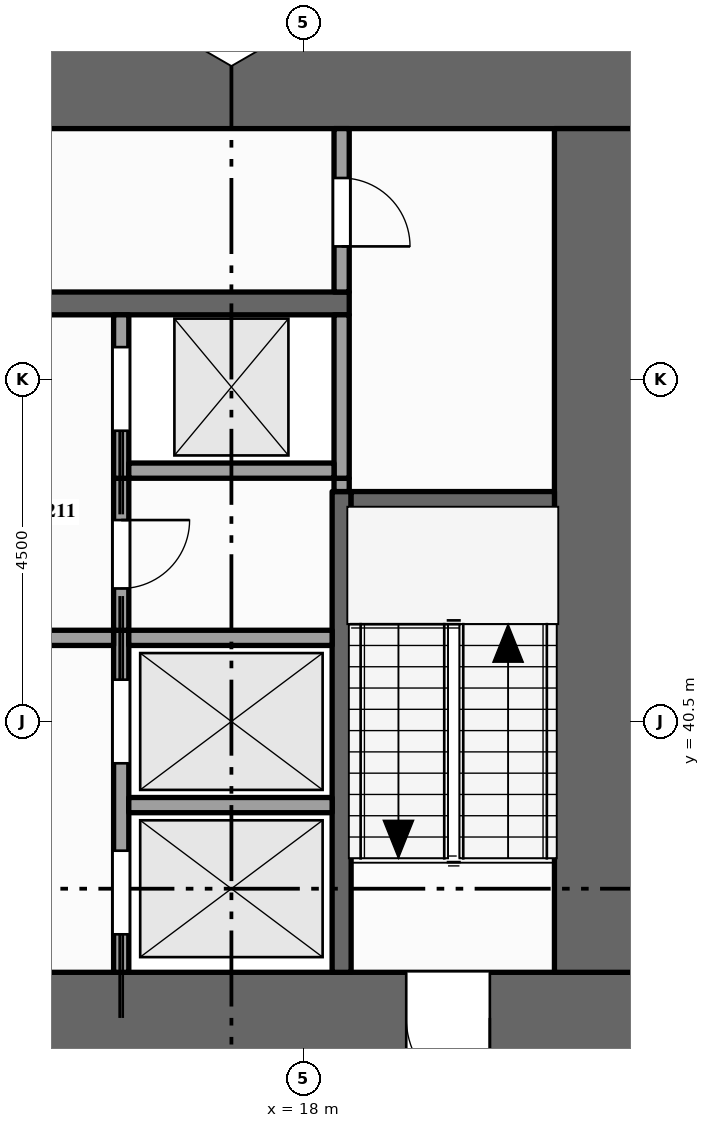
"""IFC4 building model, lengths in metres.
Left out: names, types, materials, properties, quantities, classifications, styles, units other than length and angle.
Written with IfcOpenShell. Run it as: python <this file> out.ifc"""

import sys

from ifc_helpers import new_model, si_unit, direction, frame, frame_2d, origin, place, context, subcontext, project, spatial, rectangle, extrude, element, fill, save


model = new_model("IFC4")
c1 = context("Model", 3, precision=1e-05, world=origin(), true_north=direction((0.0, 1.0)))
c2 = subcontext(c1, "Body", "Model", "MODEL_VIEW")
j1 = project(units=[si_unit("LENGTHUNIT", "METRE"), si_unit("PLANEANGLEUNIT", "RADIAN")], contexts=[c1])
p1 = place(None, origin())
s1 = spatial("IfcSite", under=j1, at=p1, CompositionType="ELEMENT")
p2 = place(p1, origin())
s2 = spatial("IfcBuilding", under=s1, at=p2, CompositionType="ELEMENT")
p3 = place(p2, frame((0.0, 0.0, 57.0)))
s3 = spatial("IfcBuildingStorey", under=s2, at=p3, CompositionType="ELEMENT", Elevation=57.0)
p4 = place(p3, frame((0.0, 36.6, -0.15), z_axis=(0.0, 0.0, 1.0), x_axis=(1.0, 0.0, 0.0)))
e1 = element("IfcWall", 1, at=p4, inside=s3, PredefinedType="SHEAR", context=c2, shape_type="SweptSolid", body=[
    extrude(rectangle(XDim=22.5, YDim=1.2, at=frame_2d((11.25, 0.0))), origin(), (0.0, 0.0, 1.0), 4.0),
])
p5 = place(p4, frame((7.1, 0.0, 0.15)))
e2 = element("IfcOpeningElement", 2, at=p5, cuts=e1, PredefinedType="OPENING", context=c2, shape_type="SweptSolid", body=[
    extrude(rectangle(XDim=1.8, YDim=2.1, at=frame_2d((0.9, 1.05))), frame((0.0, 0.61, 0.0), z_axis=(0.0, -1.0, 0.0), x_axis=(1.0, 0.0, 0.0)), (0.0, 0.0, 1.0), 1.22),
])
p6 = place(p4, frame((13.15, 0.0, 0.15)))
e3 = element("IfcOpeningElement", 3, at=p6, cuts=e1, PredefinedType="OPENING", context=c2, shape_type="SweptSolid", body=[
    extrude(rectangle(XDim=1.1, YDim=2.1, at=frame_2d((0.55, 1.05))), frame((0.0, 0.61, 0.0), z_axis=(0.0, -1.0, 0.0), x_axis=(1.0, 0.0, 0.0)), (0.0, 0.0, 1.0), 1.22),
])
p7 = place(p4, frame((2.15, 0.0, 0.15)))
e4 = element("IfcOpeningElement", 4, at=p7, cuts=e1, PredefinedType="OPENING", context=c2, shape_type="SweptSolid", body=[
    extrude(rectangle(XDim=1.1, YDim=2.1, at=frame_2d((0.55, 1.05))), frame((0.0, 0.61, 0.0), z_axis=(0.0, -1.0, 0.0), x_axis=(1.0, 0.0, 0.0)), (0.0, 0.0, 1.0), 1.22),
])
p8 = place(p4, frame((19.35, 0.0, 0.15)))
e5 = element("IfcOpeningElement", 5, at=p8, cuts=e1, PredefinedType="OPENING", context=c2, shape_type="SweptSolid", body=[
    extrude(rectangle(XDim=1.1, YDim=2.1, at=frame_2d((0.55, 1.05))), frame((0.0, 0.61, 0.0), z_axis=(0.0, -1.0, 0.0), x_axis=(1.0, 0.0, 0.0)), (0.0, 0.0, 1.0), 1.22),
])
p9 = place(p3, frame((0.0, 48.9, -0.15), z_axis=(0.0, 0.0, 1.0), x_axis=(1.0, 0.0, 0.0)))
e6 = element("IfcWall", 6, at=p9, inside=s3, PredefinedType="SHEAR", context=c2, shape_type="SweptSolid", body=[
    extrude(rectangle(XDim=22.5, YDim=1.2, at=frame_2d((11.25, 0.0))), origin(), (0.0, 0.0, 1.0), 4.0),
])
p10 = place(p3, frame((21.9, 37.2, -0.15), z_axis=(0.0, 0.0, 1.0), x_axis=(0.0, 1.0, 0.0)))
e7 = element("IfcWall", 7, at=p10, inside=s3, PredefinedType="SHEAR", context=c2, shape_type="SweptSolid", body=[
    extrude(rectangle(XDim=11.1, YDim=1.2, at=frame_2d((5.55, 0.0))), origin(), (0.0, 0.0, 1.0), 4.0),
])
p11 = place(p3, frame((15.6, 37.2, 0.0), z_axis=(0.0, 0.0, 1.0), x_axis=(0.0, 1.0, 0.0)))
e8 = element("IfcWall", 8, at=p11, inside=s3, PredefinedType="SOLIDWALL", context=c2, shape_type="SweptSolid", body=[
    extrude(rectangle(XDim=4.5, YDim=0.2, at=frame_2d((2.25, 0.0))), origin(), (0.0, 0.0, 1.0), 3.85),
])
p12 = place(p11, frame((0.5, 0.0, 0.012)))
e9 = element("IfcOpeningElement", 9, at=p12, cuts=e8, PredefinedType="OPENING", context=c2, shape_type="SweptSolid", body=[
    extrude(rectangle(XDim=1.1, YDim=2.1, at=frame_2d((0.55, 1.05))), frame((0.0, 0.11, 0.0), z_axis=(0.0, -1.0, 0.0), x_axis=(1.0, 0.0, 0.0)), (0.0, 0.0, 1.0), 0.22),
])
p13 = place(p11, frame((2.75, 0.0, 0.012)))
e10 = element("IfcOpeningElement", 10, at=p13, cuts=e8, PredefinedType="OPENING", context=c2, shape_type="SweptSolid", body=[
    extrude(rectangle(XDim=1.1, YDim=2.1, at=frame_2d((0.55, 1.05))), frame((0.0, 0.11, 0.0), z_axis=(0.0, -1.0, 0.0), x_axis=(1.0, 0.0, 0.0)), (0.0, 0.0, 1.0), 0.22),
])
p14 = place(p3, frame((15.6, 41.7, 0.0), z_axis=(0.0, 0.0, 1.0), x_axis=(0.0, 1.0, 0.0)))
e11 = element("IfcWall", 11, at=p14, inside=s3, PredefinedType="PARTITIONING", context=c2, shape_type="SweptSolid", body=[
    extrude(rectangle(XDim=2.0, YDim=0.2, at=frame_2d((1.0, 0.0))), origin(), (0.0, 0.0, 1.0), 3.85),
])
p15 = place(p14, frame((0.55, 0.0, 0.0)))
e12 = element("IfcOpeningElement", 12, at=p15, cuts=e11, PredefinedType="OPENING", context=c2, shape_type="SweptSolid", body=[
    extrude(rectangle(XDim=0.9, YDim=2.1, at=frame_2d((0.45, 1.05))), frame((0.0, 0.11, 0.0), z_axis=(0.0, -1.0, 0.0), x_axis=(1.0, 0.0, 0.0)), (0.0, 0.0, 1.0), 0.22),
])
p16 = place(p3, frame((15.6, 43.7, 0.0), z_axis=(0.0, 0.0, 1.0), x_axis=(0.0, 1.0, 0.0)))
e13 = element("IfcWall", 13, at=p16, inside=s3, PredefinedType="SOLIDWALL", context=c2, shape_type="SweptSolid", body=[
    extrude(rectangle(XDim=2.15, YDim=0.2, at=frame_2d((1.075, 0.0))), origin(), (0.0, 0.0, 1.0), 3.85),
])
p17 = place(p16, frame((0.625, 0.0, 0.012)))
e14 = element("IfcOpeningElement", 14, at=p17, cuts=e13, PredefinedType="OPENING", context=c2, shape_type="SweptSolid", body=[
    extrude(rectangle(XDim=1.1, YDim=2.1, at=frame_2d((0.55, 1.05))), frame((0.0, 0.11, 0.0), z_axis=(0.0, -1.0, 0.0), x_axis=(1.0, 0.0, 0.0)), (0.0, 0.0, 1.0), 0.22),
])
p18 = place(p3, frame((18.5, 37.2, 0.0), z_axis=(0.0, 0.0, 1.0), x_axis=(0.0, 1.0, 0.0)))
e15 = element("IfcWall", 15, at=p18, inside=s3, PredefinedType="SHEAR", context=c2, shape_type="SweptSolid", body=[
    extrude(rectangle(XDim=6.325, YDim=0.25, at=frame_2d((3.163, 0.0))), origin(), (0.0, 0.0, 1.0), 3.85),
])
p19 = place(p3, frame((18.5, 43.525, 0.0), z_axis=(0.0, 0.0, 1.0), x_axis=(0.0, 1.0, 0.0)))
e16 = element("IfcWall", 16, at=p19, inside=s3, PredefinedType="PARTITIONING", context=c2, shape_type="SweptSolid", body=[
    extrude(rectangle(XDim=0.175, YDim=0.2, at=frame_2d((0.087, 0.0))), origin(), (0.0, 0.0, 1.0), 3.85),
])
p20 = place(p3, frame((18.5, 43.7, 0.0), z_axis=(0.0, 0.0, 1.0), x_axis=(0.0, 1.0, 0.0)))
e17 = element("IfcWall", 17, at=p20, inside=s3, PredefinedType="SOLIDWALL", context=c2, shape_type="SweptSolid", body=[
    extrude(rectangle(XDim=2.15, YDim=0.2, at=frame_2d((1.075, 0.0))), origin(), (0.0, 0.0, 1.0), 3.85),
])
p21 = place(p3, frame((18.5, 46.15, 0.0), z_axis=(0.0, 0.0, 1.0), x_axis=(0.0, 1.0, 0.0)))
e18 = element("IfcWall", 18, at=p21, inside=s3, PredefinedType="PARTITIONING", context=c2, shape_type="SweptSolid", body=[
    extrude(rectangle(XDim=2.15, YDim=0.2, at=frame_2d((1.075, 0.0))), origin(), (0.0, 0.0, 1.0), 3.85),
])
p22 = place(p21, frame((0.6, 0.0, 0.0)))
e19 = element("IfcOpeningElement", 19, at=p22, cuts=e18, PredefinedType="OPENING", context=c2, shape_type="SweptSolid", body=[
    extrude(rectangle(XDim=0.9, YDim=2.1, at=frame_2d((0.45, 1.05))), frame((0.0, 0.11, 0.0), z_axis=(0.0, -1.0, 0.0), x_axis=(1.0, 0.0, 0.0)), (0.0, 0.0, 1.0), 0.22),
])
p23 = place(p3, frame((15.7, 39.4, 0.0), z_axis=(0.0, 0.0, 1.0), x_axis=(1.0, 0.0, 0.0)))
e20 = element("IfcWall", 20, at=p23, inside=s3, PredefinedType="SOLIDWALL", context=c2, shape_type="SweptSolid", body=[
    extrude(rectangle(XDim=2.675, YDim=0.2, at=frame_2d((1.337, 0.0))), origin(), (0.0, 0.0, 1.0), 3.85),
])
p24 = place(p3, frame((11.9, 41.6, 0.0), z_axis=(0.0, 0.0, 1.0), x_axis=(1.0, 0.0, 0.0)))
e21 = element("IfcWall", 21, at=p24, inside=s3, PredefinedType="PARTITIONING", context=c2, shape_type="SweptSolid", body=[
    extrude(rectangle(XDim=3.6, YDim=0.2, at=frame_2d((1.8, 0.0))), origin(), (0.0, 0.0, 1.0), 3.85),
])
p25 = place(p24, frame((1.3, 0.0, 0.0)))
e22 = element("IfcOpeningElement", 22, at=p25, cuts=e21, PredefinedType="OPENING", context=c2, shape_type="SweptSolid", body=[
    extrude(rectangle(XDim=1.0, YDim=2.1, at=frame_2d((0.5, 1.05))), frame((0.0, 0.11, 0.0), z_axis=(0.0, -1.0, 0.0), x_axis=(1.0, 0.0, 0.0)), (0.0, 0.0, 1.0), 0.22),
])
p26 = place(p3, frame((15.7, 41.6, 0.0), z_axis=(0.0, 0.0, 1.0), x_axis=(1.0, 0.0, 0.0)))
e23 = element("IfcWall", 23, at=p26, inside=s3, PredefinedType="SOLIDWALL", context=c2, shape_type="SweptSolid", body=[
    extrude(rectangle(XDim=2.675, YDim=0.2, at=frame_2d((1.337, 0.0))), origin(), (0.0, 0.0, 1.0), 3.85),
])
p27 = place(p3, frame((18.625, 43.4, 0.0), z_axis=(0.0, 0.0, 1.0), x_axis=(1.0, 0.0, 0.0)))
e24 = element("IfcWall", 24, at=p27, inside=s3, PredefinedType="SHEAR", context=c2, shape_type="SweptSolid", body=[
    extrude(rectangle(XDim=2.675, YDim=0.25, at=frame_2d((1.337, 0.0))), origin(), (0.0, 0.0, 1.0), 3.85),
])
p28 = place(p3, frame((15.7, 43.8, 0.0), z_axis=(0.0, 0.0, 1.0), x_axis=(1.0, 0.0, 0.0)))
e25 = element("IfcWall", 25, at=p28, inside=s3, PredefinedType="SOLIDWALL", context=c2, shape_type="SweptSolid", body=[
    extrude(rectangle(XDim=2.7, YDim=0.2, at=frame_2d((1.35, 0.0))), origin(), (0.0, 0.0, 1.0), 3.85),
])
p29 = place(p3, frame((4.1, 46.0, 0.0), z_axis=(0.0, 0.0, 1.0), x_axis=(1.0, 0.0, 0.0)))
e26 = element("IfcWall", 26, at=p29, inside=s3, PredefinedType="SHEAR", context=c2, shape_type="SweptSolid", body=[
    extrude(rectangle(XDim=14.5, YDim=0.3, at=frame_2d((7.25, 0.0))), origin(), (0.0, 0.0, 1.0), 3.85),
])
p30 = place(p29, frame((3.4, 0.0, 0.0)))
e27 = element("IfcOpeningElement", 27, at=p30, cuts=e26, PredefinedType="OPENING", context=c2, shape_type="SweptSolid", body=[
    extrude(rectangle(XDim=1.0, YDim=2.1, at=frame_2d((0.5, 1.05))), frame((0.0, 0.16, 0.0), z_axis=(0.0, -1.0, 0.0), x_axis=(1.0, 0.0, 0.0)), (0.0, 0.0, 1.0), 0.32),
])
p31 = place(p29, frame((9.1, 0.0, 0.0)))
e28 = element("IfcOpeningElement", 28, at=p31, cuts=e26, PredefinedType="OPENING", context=c2, shape_type="SweptSolid", body=[
    extrude(rectangle(XDim=1.0, YDim=2.1, at=frame_2d((0.5, 1.05))), frame((0.0, 0.16, 0.0), z_axis=(0.0, -1.0, 0.0), x_axis=(1.0, 0.0, 0.0)), (0.0, 0.0, 1.0), 0.32),
])
p32 = place(p12, origin())
e29 = element("IfcDoor", 29, at=p32, inside=s3, OperationType="SLIDING_TO_LEFT", PredefinedType="DOOR", context=c2, shape_type="SweptSolid", body=[
    extrude(rectangle(XDim=1.1, YDim=2.1, at=frame_2d((0.55, 1.05))), frame((0.0, 0.025, 0.0), z_axis=(0.0, -1.0, 0.0), x_axis=(1.0, 0.0, 0.0)), (0.0, 0.0, 1.0), 0.05),
])
fill(e9, e29)
p33 = place(p13, origin())
e30 = element("IfcDoor", 30, at=p33, inside=s3, OperationType="SLIDING_TO_RIGHT", PredefinedType="DOOR", context=c2, shape_type="SweptSolid", body=[
    extrude(rectangle(XDim=1.1, YDim=2.1, at=frame_2d((0.55, 1.05))), frame((0.0, 0.025, 0.0), z_axis=(0.0, -1.0, 0.0), x_axis=(1.0, 0.0, 0.0)), (0.0, 0.0, 1.0), 0.05),
])
fill(e10, e30)
p34 = place(p17, origin())
e31 = element("IfcDoor", 31, at=p34, inside=s3, OperationType="SLIDING_TO_LEFT", PredefinedType="DOOR", context=c2, shape_type="SweptSolid", body=[
    extrude(rectangle(XDim=1.1, YDim=2.1, at=frame_2d((0.55, 1.05))), frame((0.0, 0.025, 0.0), z_axis=(0.0, -1.0, 0.0), x_axis=(1.0, 0.0, 0.0)), (0.0, 0.0, 1.0), 0.05),
])
fill(e14, e31)
p35 = place(p8, origin())
e32 = element("IfcDoor", 32, at=p35, inside=s3, OperationType="SINGLE_SWING_RIGHT", PredefinedType="DOOR", context=c2, shape_type="SweptSolid", body=[
    extrude(rectangle(XDim=1.1, YDim=2.1, at=frame_2d((0.55, 1.05))), frame((0.0, 0.025, 0.0), z_axis=(0.0, -1.0, 0.0), x_axis=(1.0, 0.0, 0.0)), (0.0, 0.0, 1.0), 0.05),
])
fill(e5, e32)
p36 = place(p22, origin())
e33 = element("IfcDoor", 33, at=p36, inside=s3, OperationType="SINGLE_SWING_LEFT", PredefinedType="DOOR", context=c2, shape_type="SweptSolid", body=[
    extrude(rectangle(XDim=0.9, YDim=2.1, at=frame_2d((0.45, 1.05))), frame((0.0, 0.025, 0.0), z_axis=(0.0, -1.0, 0.0), x_axis=(1.0, 0.0, 0.0)), (0.0, 0.0, 1.0), 0.05),
])
fill(e19, e33)
p37 = place(p15, origin())
e34 = element("IfcDoor", 34, at=p37, inside=s3, OperationType="SINGLE_SWING_RIGHT", PredefinedType="DOOR", context=c2, shape_type="SweptSolid", body=[
    extrude(rectangle(XDim=0.9, YDim=2.1, at=frame_2d((0.45, 1.05))), frame((0.0, 0.025, 0.0), z_axis=(0.0, -1.0, 0.0), x_axis=(1.0, 0.0, 0.0)), (0.0, 0.0, 1.0), 0.05),
])
fill(e12, e34)
save(model, sys.argv[1])
